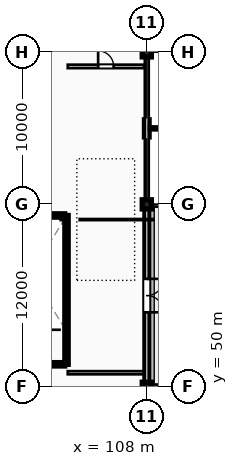
"""IFC4 building model, lengths in metres.
Left out: names, types, materials, properties, quantities, classifications, styles, units other than length and angle.
Written with IfcOpenShell. Run it as: python <this file> out.ifc"""

import sys

from ifc_helpers import new_model, si_unit, direction, frame, frame_2d, origin, origin_2d, place, context, subcontext, project, spatial, rectangle, extrude, element, fill, save


model = new_model("IFC4")
c1 = context("Model", 3, precision=1e-05, world=origin(), true_north=direction((0.0, 1.0)))
c2 = subcontext(c1, "Body", "Model", "MODEL_VIEW")
j1 = project(units=[si_unit("LENGTHUNIT", "METRE"), si_unit("PLANEANGLEUNIT", "RADIAN")], contexts=[c1])
p1 = place(None, origin())
s1 = spatial("IfcSite", under=j1, at=p1, CompositionType="ELEMENT")
p2 = place(p1, origin())
s2 = spatial("IfcBuilding", under=s1, at=p2, CompositionType="ELEMENT")
p3 = place(p2, frame((0.0, 0.0, 24.0)))
s3 = spatial("IfcBuildingStorey", under=s2, at=p3, CompositionType="ELEMENT", Elevation=24.0)
for number, where, z_axis, x_axis in (
    (1, (108.0, 50.0, 0.0), (0.0, 0.0, 1.0), (1.0, 0.0, 0.0)),
    (2, (108.0, 62.0, 0.0), (0.0, 0.0, 1.0), (1.0, 0.0, 0.0)),
    (3, (108.0, 72.0, 0.0), (0.0, 0.0, 1.0), (1.0, 0.0, 0.0)),
):
    element("IfcColumn", number, at=place(p3, frame(where, z_axis=z_axis, x_axis=x_axis)), inside=s3, PredefinedType="COLUMN", context=c2, shape_type="SweptSolid", body=[
        extrude(rectangle(XDim=0.6, YDim=0.6, at=origin_2d()), origin(), (0.0, 0.0, 1.0), 4.8),
    ])
p4 = place(p3, frame((108.0, 50.145, 0.0), z_axis=(0.0, 0.0, 1.0), x_axis=(0.0, 1.0, 0.0)))
e4 = element("IfcWall", 4, at=p4, inside=s3, PredefinedType="STANDARD", context=c2, shape_type="SweptSolid", body=[
    extrude(rectangle(XDim=11.71, YDim=0.42, at=frame_2d((5.855, 0.0))), origin(), (0.0, 0.0, 1.0), 4.109),
])
p5 = place(p4, frame((4.755, 0.0, 0.0)))
e5 = element("IfcOpeningElement", 5, at=p5, cuts=e4, PredefinedType="OPENING", context=c2, shape_type="SweptSolid", body=[
    extrude(rectangle(XDim=2.2, YDim=2.4, at=frame_2d((1.1, 1.2))), frame((0.0, 0.22, 0.0), z_axis=(0.0, -1.0, 0.0), x_axis=(1.0, 0.0, 0.0)), (0.0, 0.0, 1.0), 0.44),
])
p6 = place(p3, frame((108.0, 66.35, 0.0), z_axis=(0.0, 0.0, 1.0), x_axis=(0.0, 1.0, 0.0)))
e6 = element("IfcWall", 6, at=p6, inside=s3, PredefinedType="STANDARD", context=c2, shape_type="SweptSolid", body=[
    extrude(rectangle(XDim=1.3, YDim=0.48, at=frame_2d((0.65, 0.0))), origin(), (0.0, 0.0, 1.0), 4.109),
])
for number, where, z_axis, x_axis in (
    (7, (108.0, 62.145, 0.0), (0.0, 0.0, 1.0), (0.0, 1.0, 0.0)),
    (8, (108.0, 71.63, 0.0), (0.0, 0.0, 1.0), (0.0, 1.0, 0.0)),
):
    element("IfcWall", number, at=place(p3, frame(where, z_axis=z_axis, x_axis=x_axis)), inside=s3, PredefinedType="STANDARD", context=c2, shape_type="SweptSolid", body=[
        extrude(rectangle(XDim=0.225, YDim=0.3, at=frame_2d((0.113, 0.0))), origin(), (0.0, 0.0, 1.0), 4.56),
    ])
p7 = place(p3, frame((108.0, 40.35, 4.6), z_axis=(0.0, 0.0, 1.0), x_axis=(0.0, 1.0, 0.0)))
e9 = element("IfcWall", 9, at=p7, inside=s3, PredefinedType="PARAPET", context=c2, shape_type="SweptSolid", body=[
    extrude(rectangle(XDim=41.3, YDim=0.26, at=frame_2d((20.65, 0.0))), origin(), (0.0, 0.0, 1.0), 0.55),
])
p8 = place(p3, frame((102.72, 51.48, 0.0), z_axis=(0.0, 0.0, 1.0), x_axis=(0.0, 1.0, 0.0)))
e10 = element("IfcWall", 10, at=p8, inside=s3, PredefinedType="SHEAR", context=c2, shape_type="SweptSolid", body=[
    extrude(rectangle(XDim=9.79, YDim=0.22, at=frame_2d((4.895, 0.0))), origin(), (0.0, 0.0, 1.0), 4.56),
])
p9 = place(p3, frame((98.2, 61.27, 0.0), z_axis=(0.0, 0.0, 1.0), x_axis=(1.0, 0.0, 0.0)))
e11 = element("IfcWall", 11, at=p9, inside=s3, PredefinedType="SHEAR", context=c2, shape_type="SweptSolid", body=[
    extrude(rectangle(XDim=4.4, YDim=0.22, at=frame_2d((2.2, 0.0))), origin(), (0.0, 0.0, 1.0), 4.56),
])
p10 = place(p3, frame((98.2, 51.48, 0.0), z_axis=(0.0, 0.0, 1.0), x_axis=(1.0, 0.0, 0.0)))
e12 = element("IfcWall", 12, at=p10, inside=s3, PredefinedType="SHEAR", context=c2, shape_type="SweptSolid", body=[
    extrude(rectangle(XDim=4.4, YDim=0.22, at=frame_2d((2.2, 0.0))), origin(), (0.0, 0.0, 1.0), 4.56),
])
p11 = place(p10, frame((1.65, 0.0, 0.0)))
e13 = element("IfcOpeningElement", 13, at=p11, cuts=e12, PredefinedType="OPENING", context=c2, shape_type="SweptSolid", body=[
    extrude(rectangle(XDim=1.1, YDim=2.2, at=frame_2d((0.55, 1.1))), frame((0.0, 0.12, 0.0), z_axis=(0.0, -1.0, 0.0), x_axis=(1.0, 0.0, 0.0)), (0.0, 0.0, 1.0), 0.24),
])
p12 = place(p3, frame((102.8, 71.075, 0.0), z_axis=(0.0, 0.0, 1.0), x_axis=(1.0, 0.0, 0.0)))
e14 = element("IfcWall", 14, at=p12, inside=s3, PredefinedType="PARTITIONING", context=c2, shape_type="SweptSolid", body=[
    extrude(rectangle(XDim=5.02, YDim=0.23, at=frame_2d((2.51, 0.0))), origin(), (0.0, 0.0, 1.0), 4.52),
])
p13 = place(p12, frame((2.0, 0.0, 0.0)))
e15 = element("IfcOpeningElement", 15, at=p13, cuts=e14, PredefinedType="OPENING", context=c2, shape_type="SweptSolid", body=[
    extrude(rectangle(XDim=1.02, YDim=2.1, at=frame_2d((0.51, 1.05))), frame((0.0, 0.125, 0.0), z_axis=(0.0, -1.0, 0.0), x_axis=(1.0, 0.0, 0.0)), (0.0, 0.0, 1.0), 0.25),
])
p14 = place(p3, frame((102.8, 50.925, 0.0), z_axis=(0.0, 0.0, 1.0), x_axis=(1.0, 0.0, 0.0)))
e16 = element("IfcWall", 16, at=p14, inside=s3, PredefinedType="PARTITIONING", context=c2, shape_type="SweptSolid", body=[
    extrude(rectangle(XDim=5.02, YDim=0.21, at=frame_2d((2.51, 0.0))), origin(), (0.0, 0.0, 1.0), 4.52),
])
p15 = place(p5, frame((2.2, 0.0, 0.0), z_axis=(0.0, 0.0, 1.0), x_axis=(-1.0, 0.0, 0.0)))
e17 = element("IfcDoor", 17, at=p15, inside=s3, OperationType="DOUBLE_DOOR_SINGLE_SWING", PredefinedType="DOOR", context=c2, shape_type="SweptSolid", body=[
    extrude(rectangle(XDim=2.2, YDim=2.4, at=frame_2d((1.1, 1.2))), frame((0.0, 0.025, 0.0), z_axis=(0.0, -1.0, 0.0), x_axis=(1.0, 0.0, 0.0)), (0.0, 0.0, 1.0), 0.05),
])
fill(e5, e17)
p16 = place(p13, origin())
e18 = element("IfcDoor", 18, at=p16, inside=s3, OperationType="SINGLE_SWING_LEFT", PredefinedType="DOOR", context=c2, shape_type="SweptSolid", body=[
    extrude(rectangle(XDim=1.02, YDim=2.1, at=frame_2d((0.51, 1.05))), frame((0.0, 0.025, 0.0), z_axis=(0.0, -1.0, 0.0), x_axis=(1.0, 0.0, 0.0)), (0.0, 0.0, 1.0), 0.05),
])
fill(e15, e18)
save(model, sys.argv[1])
